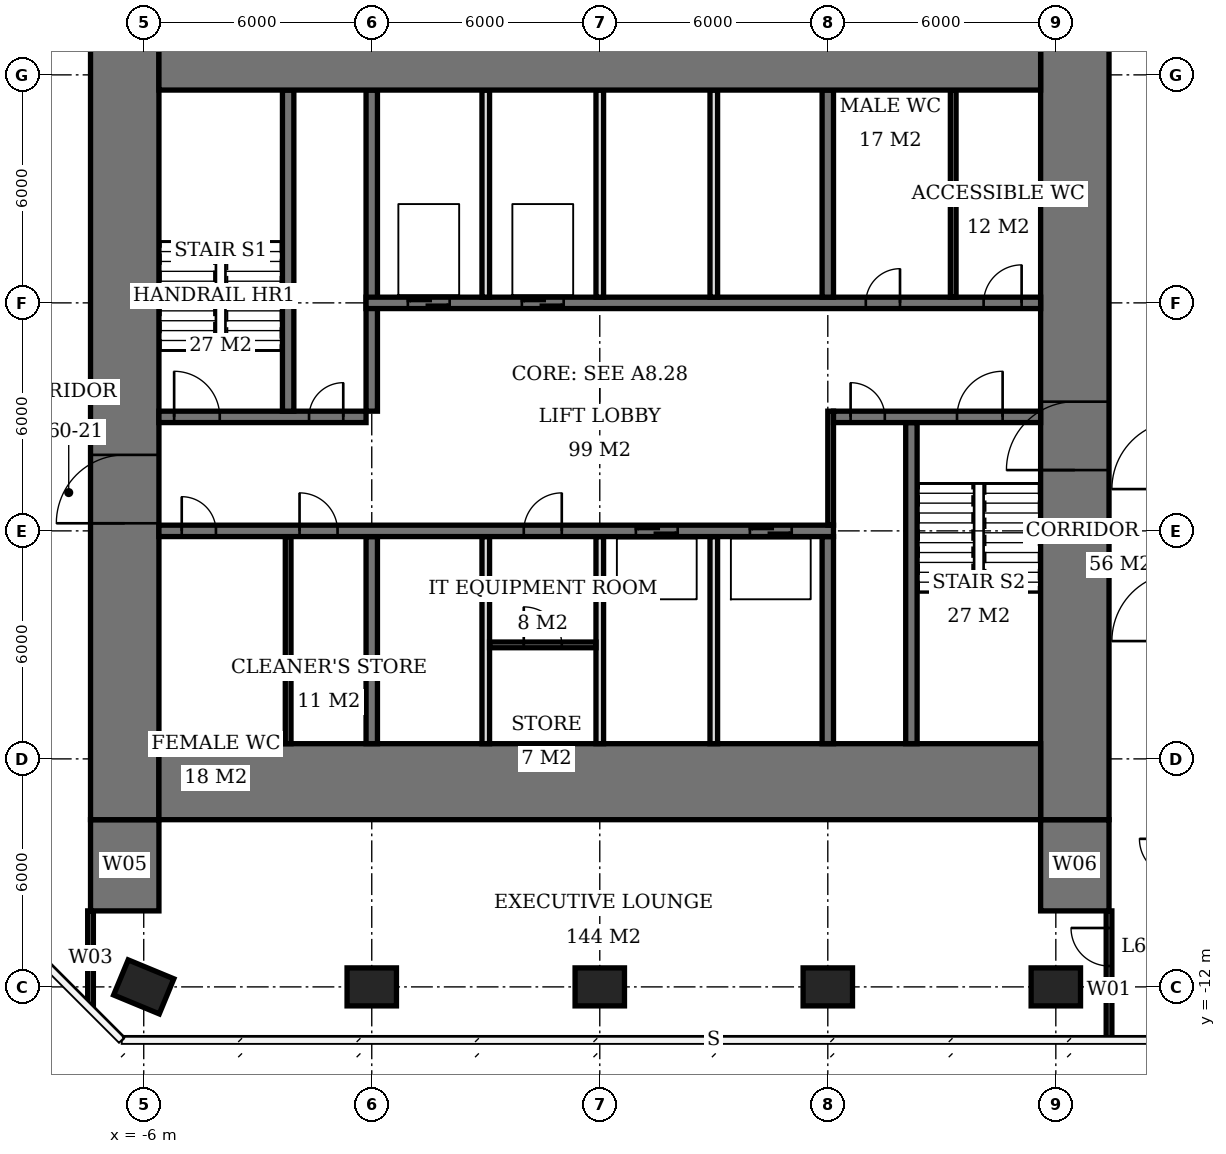
"""IFC4 building model, lengths in metres.
Left out: names, types, materials, properties, quantities, classifications, styles, units other than length and angle.
Written with IfcOpenShell. Run it as: python <this file> out.ifc"""

import sys

from ifc_helpers import new_model, si_unit, direction, frame, frame_2d, origin, origin_2d, place, context, subcontext, project, spatial, rectangle, extrude, element, fill, save


model = new_model("IFC4")
c1 = context("Model", 3, precision=1e-05, world=origin(), true_north=direction((0.0, 1.0)))
c2 = subcontext(c1, "Body", "Model", "MODEL_VIEW")
j1 = project(units=[si_unit("LENGTHUNIT", "METRE"), si_unit("PLANEANGLEUNIT", "RADIAN")], contexts=[c1])
p1 = place(None, origin())
s1 = spatial("IfcSite", under=j1, at=p1, CompositionType="ELEMENT")
p2 = place(p1, origin())
s2 = spatial("IfcBuilding", under=s1, at=p2, CompositionType="ELEMENT")
p3 = place(p2, frame((0.0, 0.0, 245.0)))
s3 = spatial("IfcBuildingStorey", under=s2, at=p3, CompositionType="ELEMENT", Elevation=245.0)
for number, where, z_axis, x_axis in (
    (1, (-6.0, -12.0, 0.0), (0.0, 0.0, 1.0), (-0.924, 0.383, 0.0)),
    (2, (0.0, -12.0, 0.0), (0.0, 0.0, 1.0), (1.0, 0.0, 0.0)),
    (3, (6.0, -12.0, 0.0), (0.0, 0.0, 1.0), (1.0, 0.0, 0.0)),
    (4, (12.0, -12.0, 0.0), (0.0, 0.0, 1.0), (1.0, 0.0, 0.0)),
    (5, (18.0, -12.0, 0.0), (0.0, 0.0, 1.0), (1.0, 0.0, 0.0)),
):
    element("IfcColumn", number, at=place(p3, frame(where, z_axis=z_axis, x_axis=x_axis)), inside=s3, PredefinedType="COLUMN", context=c2, shape_type="SweptSolid", body=[
        extrude(rectangle(XDim=1.3, YDim=1.0, at=origin_2d()), origin(), (0.0, 0.0, 1.0), 3.9),
    ])
for number, where, z_axis, x_axis in (
    (6, (-5.6, -6.6, 0.0), (0.0, 0.0, 1.0), (1.0, 0.0, 0.0)),
    (7, (-5.6, 12.6, 0.0), (0.0, 0.0, 1.0), (1.0, 0.0, 0.0)),
):
    element("IfcWall", number, at=place(p3, frame(where, z_axis=z_axis, x_axis=x_axis)), inside=s3, PredefinedType="SHEAR", context=c2, shape_type="SweptSolid", body=[
        extrude(rectangle(XDim=23.2, YDim=2.0, at=frame_2d((11.6, 0.0))), origin(), (0.0, 0.0, 1.0), 3.9),
    ])
p4 = place(p3, frame((-6.5, -7.6, 0.0), z_axis=(0.0, 0.0, 1.0), x_axis=(0.0, 1.0, 0.0)))
e8 = element("IfcWall", 8, at=p4, inside=s3, PredefinedType="SHEAR", context=c2, shape_type="SweptSolid", body=[
    extrude(rectangle(XDim=21.2, YDim=1.8, at=frame_2d((10.6, 0.0))), origin(), (0.0, 0.0, 1.0), 3.9),
])
p5 = place(p4, frame((7.8, 0.0, 0.0)))
e9 = element("IfcOpeningElement", 9, at=p5, cuts=e8, PredefinedType="OPENING", context=c2, shape_type="SweptSolid", body=[
    extrude(rectangle(XDim=1.8, YDim=2.4, at=frame_2d((0.9, 1.2))), frame((0.0, 0.91, 0.0), z_axis=(0.0, -1.0, 0.0), x_axis=(1.0, 0.0, 0.0)), (0.0, 0.0, 1.0), 1.82),
])
p6 = place(p3, frame((18.5, -7.6, 0.0), z_axis=(0.0, 0.0, 1.0), x_axis=(0.0, 1.0, 0.0)))
e10 = element("IfcWall", 10, at=p6, inside=s3, PredefinedType="SHEAR", context=c2, shape_type="SweptSolid", body=[
    extrude(rectangle(XDim=21.2, YDim=1.8, at=frame_2d((10.6, 0.0))), origin(), (0.0, 0.0, 1.0), 3.9),
])
p7 = place(p6, frame((9.2, 0.0, 0.0)))
e11 = element("IfcOpeningElement", 11, at=p7, cuts=e10, PredefinedType="OPENING", context=c2, shape_type="SweptSolid", body=[
    extrude(rectangle(XDim=1.8, YDim=2.4, at=frame_2d((0.9, 1.2))), frame((0.0, 0.91, 0.0), z_axis=(0.0, -1.0, 0.0), x_axis=(1.0, 0.0, 0.0)), (0.0, 0.0, 1.0), 1.82),
])
for number, where, z_axis, x_axis in (
    (12, (-6.5, -10.0, 0.0), (0.0, 0.0, 1.0), (0.0, 1.0, 0.0)),
    (13, (18.5, -10.0, 0.0), (0.0, 0.0, 1.0), (0.0, 1.0, 0.0)),
):
    element("IfcWall", number, at=place(p3, frame(where, z_axis=z_axis, x_axis=x_axis)), inside=s3, PredefinedType="SHEAR", context=c2, shape_type="SweptSolid", body=[
        extrude(rectangle(XDim=2.4, YDim=1.8, at=frame_2d((1.2, 0.0))), origin(), (0.0, 0.0, 1.0), 3.9),
    ])
p8 = place(p3, frame((-5.6, 0.0, 0.0), z_axis=(0.0, 0.0, 1.0), x_axis=(1.0, 0.0, 0.0)))
e14 = element("IfcWall", 14, at=p8, inside=s3, PredefinedType="SHEAR", context=c2, shape_type="SweptSolid", body=[
    extrude(rectangle(XDim=17.75, YDim=0.3, at=frame_2d((8.875, 0.0))), origin(), (0.0, 0.0, 1.0), 3.9),
])
p9 = place(p8, frame((0.6, 0.0, 0.0)))
e15 = element("IfcOpeningElement", 15, at=p9, cuts=e14, PredefinedType="OPENING", context=c2, shape_type="SweptSolid", body=[
    extrude(rectangle(XDim=0.9, YDim=2.1, at=frame_2d((0.45, 1.05))), frame((0.0, 0.16, 0.0), z_axis=(0.0, -1.0, 0.0), x_axis=(1.0, 0.0, 0.0)), (0.0, 0.0, 1.0), 0.32),
])
p10 = place(p8, frame((3.7, 0.0, 0.0)))
e16 = element("IfcOpeningElement", 16, at=p10, cuts=e14, PredefinedType="OPENING", context=c2, shape_type="SweptSolid", body=[
    extrude(rectangle(XDim=1.0, YDim=2.1, at=frame_2d((0.5, 1.05))), frame((0.0, 0.16, 0.0), z_axis=(0.0, -1.0, 0.0), x_axis=(1.0, 0.0, 0.0)), (0.0, 0.0, 1.0), 0.32),
])
p11 = place(p8, frame((9.6, 0.0, 0.0)))
e17 = element("IfcOpeningElement", 17, at=p11, cuts=e14, PredefinedType="OPENING", context=c2, shape_type="SweptSolid", body=[
    extrude(rectangle(XDim=1.0, YDim=2.1, at=frame_2d((0.5, 1.05))), frame((0.0, 0.16, 0.0), z_axis=(0.0, -1.0, 0.0), x_axis=(1.0, 0.0, 0.0)), (0.0, 0.0, 1.0), 0.32),
])
p12 = place(p8, frame((12.55, 0.0, 0.0)))
e18 = element("IfcOpeningElement", 18, at=p12, cuts=e14, PredefinedType="OPENING", context=c2, shape_type="SweptSolid", body=[
    extrude(rectangle(XDim=1.1, YDim=2.1, at=frame_2d((0.55, 1.05))), frame((0.0, 0.16, 0.0), z_axis=(0.0, -1.0, 0.0), x_axis=(1.0, 0.0, 0.0)), (0.0, 0.0, 1.0), 0.32),
])
p13 = place(p8, frame((15.55, 0.0, 0.0)))
e19 = element("IfcOpeningElement", 19, at=p13, cuts=e14, PredefinedType="OPENING", context=c2, shape_type="SweptSolid", body=[
    extrude(rectangle(XDim=1.1, YDim=2.1, at=frame_2d((0.55, 1.05))), frame((0.0, 0.16, 0.0), z_axis=(0.0, -1.0, 0.0), x_axis=(1.0, 0.0, 0.0)), (0.0, 0.0, 1.0), 0.32),
])
p14 = place(p3, frame((-5.6, 3.0, 0.0), z_axis=(0.0, 0.0, 1.0), x_axis=(1.0, 0.0, 0.0)))
e20 = element("IfcWall", 20, at=p14, inside=s3, PredefinedType="SHEAR", context=c2, shape_type="SweptSolid", body=[
    extrude(rectangle(XDim=5.45, YDim=0.3, at=frame_2d((2.725, 0.0))), origin(), (0.0, 0.0, 1.0), 3.9),
])
p15 = place(p14, frame((0.4, 0.0, 0.0)))
e21 = element("IfcOpeningElement", 21, at=p15, cuts=e20, PredefinedType="OPENING", context=c2, shape_type="SweptSolid", body=[
    extrude(rectangle(XDim=1.2, YDim=2.1, at=frame_2d((0.6, 1.05))), frame((0.0, 0.16, 0.0), z_axis=(0.0, -1.0, 0.0), x_axis=(1.0, 0.0, 0.0)), (0.0, 0.0, 1.0), 0.32),
])
p16 = place(p14, frame((3.95, 0.0, 0.0)))
e22 = element("IfcOpeningElement", 22, at=p16, cuts=e20, PredefinedType="OPENING", context=c2, shape_type="SweptSolid", body=[
    extrude(rectangle(XDim=0.9, YDim=2.1, at=frame_2d((0.45, 1.05))), frame((0.0, 0.16, 0.0), z_axis=(0.0, -1.0, 0.0), x_axis=(1.0, 0.0, 0.0)), (0.0, 0.0, 1.0), 0.32),
])
p17 = place(p3, frame((12.15, 3.0, 0.0), z_axis=(0.0, 0.0, 1.0), x_axis=(1.0, 0.0, 0.0)))
e23 = element("IfcWall", 23, at=p17, inside=s3, PredefinedType="SHEAR", context=c2, shape_type="SweptSolid", body=[
    extrude(rectangle(XDim=5.45, YDim=0.3, at=frame_2d((2.725, 0.0))), origin(), (0.0, 0.0, 1.0), 3.9),
])
p18 = place(p17, frame((3.25, 0.0, 0.0)))
e24 = element("IfcOpeningElement", 24, at=p18, cuts=e23, PredefinedType="OPENING", context=c2, shape_type="SweptSolid", body=[
    extrude(rectangle(XDim=1.2, YDim=2.1, at=frame_2d((0.6, 1.05))), frame((0.0, 0.16, 0.0), z_axis=(0.0, -1.0, 0.0), x_axis=(1.0, 0.0, 0.0)), (0.0, 0.0, 1.0), 0.32),
])
p19 = place(p17, frame((0.45, 0.0, 0.0)))
e25 = element("IfcOpeningElement", 25, at=p19, cuts=e23, PredefinedType="OPENING", context=c2, shape_type="SweptSolid", body=[
    extrude(rectangle(XDim=0.9, YDim=2.1, at=frame_2d((0.45, 1.05))), frame((0.0, 0.16, 0.0), z_axis=(0.0, -1.0, 0.0), x_axis=(1.0, 0.0, 0.0)), (0.0, 0.0, 1.0), 0.32),
])
p20 = place(p3, frame((-0.15, 6.0, 0.0), z_axis=(0.0, 0.0, 1.0), x_axis=(1.0, 0.0, 0.0)))
e26 = element("IfcWall", 26, at=p20, inside=s3, PredefinedType="SHEAR", context=c2, shape_type="SweptSolid", body=[
    extrude(rectangle(XDim=17.75, YDim=0.3, at=frame_2d((8.875, 0.0))), origin(), (0.0, 0.0, 1.0), 3.9),
])
p21 = place(p20, frame((13.15, 0.0, 0.0)))
e27 = element("IfcOpeningElement", 27, at=p21, cuts=e26, PredefinedType="OPENING", context=c2, shape_type="SweptSolid", body=[
    extrude(rectangle(XDim=0.9, YDim=2.1, at=frame_2d((0.45, 1.05))), frame((0.0, 0.16, 0.0), z_axis=(0.0, -1.0, 0.0), x_axis=(1.0, 0.0, 0.0)), (0.0, 0.0, 1.0), 0.32),
])
p22 = place(p20, frame((16.25, 0.0, 0.0)))
e28 = element("IfcOpeningElement", 28, at=p22, cuts=e26, PredefinedType="OPENING", context=c2, shape_type="SweptSolid", body=[
    extrude(rectangle(XDim=1.0, YDim=2.1, at=frame_2d((0.5, 1.05))), frame((0.0, 0.16, 0.0), z_axis=(0.0, -1.0, 0.0), x_axis=(1.0, 0.0, 0.0)), (0.0, 0.0, 1.0), 0.32),
])
p23 = place(p20, frame((1.1, 0.0, 0.0)))
e29 = element("IfcOpeningElement", 29, at=p23, cuts=e26, PredefinedType="OPENING", context=c2, shape_type="SweptSolid", body=[
    extrude(rectangle(XDim=1.1, YDim=2.1, at=frame_2d((0.55, 1.05))), frame((0.0, 0.16, 0.0), z_axis=(0.0, -1.0, 0.0), x_axis=(1.0, 0.0, 0.0)), (0.0, 0.0, 1.0), 0.32),
])
p24 = place(p20, frame((4.1, 0.0, 0.0)))
e30 = element("IfcOpeningElement", 30, at=p24, cuts=e26, PredefinedType="OPENING", context=c2, shape_type="SweptSolid", body=[
    extrude(rectangle(XDim=1.1, YDim=2.1, at=frame_2d((0.55, 1.05))), frame((0.0, 0.16, 0.0), z_axis=(0.0, -1.0, 0.0), x_axis=(1.0, 0.0, 0.0)), (0.0, 0.0, 1.0), 0.32),
])
p25 = place(p3, frame((0.0, -5.6, 0.0), z_axis=(0.0, 0.0, 1.0), x_axis=(0.0, 1.0, 0.0)))
e31 = element("IfcWall", 31, at=p25, inside=s3, PredefinedType="SHEAR", context=c2, shape_type="SweptSolid", body=[
    extrude(rectangle(XDim=5.45, YDim=0.3, at=frame_2d((2.725, 0.0))), origin(), (0.0, 0.0, 1.0), 3.9),
])
p26 = place(p3, frame((0.0, 3.15, 0.0), z_axis=(0.0, 0.0, 1.0), x_axis=(0.0, 1.0, 0.0)))
e32 = element("IfcWall", 32, at=p26, inside=s3, PredefinedType="SHEAR", context=c2, shape_type="SweptSolid", body=[
    extrude(rectangle(XDim=8.45, YDim=0.3, at=frame_2d((4.225, 0.0))), origin(), (0.0, 0.0, 1.0), 3.9),
])
for number, where, z_axis, x_axis in (
    (33, (12.0, -5.6, 0.0), (0.0, 0.0, 1.0), (0.0, 1.0, 0.0)),
    (34, (12.0, 6.15, 0.0), (0.0, 0.0, 1.0), (0.0, 1.0, 0.0)),
):
    element("IfcWall", number, at=place(p3, frame(where, z_axis=z_axis, x_axis=x_axis)), inside=s3, PredefinedType="SHEAR", context=c2, shape_type="SweptSolid", body=[
        extrude(rectangle(XDim=5.45, YDim=0.3, at=frame_2d((2.725, 0.0))), origin(), (0.0, 0.0, 1.0), 3.9),
    ])
for number, where, z_axis, x_axis in (
    (35, (-2.2, 3.15, 0.0), (0.0, 0.0, 1.0), (0.0, 1.0, 0.0)),
    (36, (14.2, -5.6, 0.0), (0.0, 0.0, 1.0), (0.0, 1.0, 0.0)),
):
    element("IfcWall", number, at=place(p3, frame(where, z_axis=z_axis, x_axis=x_axis)), inside=s3, PredefinedType="SHEAR", context=c2, shape_type="SweptSolid", body=[
        extrude(rectangle(XDim=8.45, YDim=0.3, at=frame_2d((4.225, 0.0))), origin(), (0.0, 0.0, 1.0), 3.9),
    ])
for number, where, z_axis, x_axis in (
    (37, (3.0, 6.15, 0.0), (0.0, 0.0, 1.0), (0.0, 1.0, 0.0)),
    (38, (6.0, 6.15, 0.0), (0.0, 0.0, 1.0), (0.0, 1.0, 0.0)),
    (39, (9.0, 6.15, 0.0), (0.0, 0.0, 1.0), (0.0, 1.0, 0.0)),
    (40, (3.0, -5.6, 0.0), (0.0, 0.0, 1.0), (0.0, 1.0, 0.0)),
    (41, (6.0, -5.6, 0.0), (0.0, 0.0, 1.0), (0.0, 1.0, 0.0)),
    (42, (9.0, -5.6, 0.0), (0.0, 0.0, 1.0), (0.0, 1.0, 0.0)),
):
    element("IfcWall", number, at=place(p3, frame(where, z_axis=z_axis, x_axis=x_axis)), inside=s3, PredefinedType="SOLIDWALL", context=c2, shape_type="SweptSolid", body=[
        extrude(rectangle(XDim=5.45, YDim=0.2, at=frame_2d((2.725, 0.0))), origin(), (0.0, 0.0, 1.0), 3.9),
    ])
for number, where, z_axis, x_axis in (
    (43, (-2.2, -5.6, 0.0), (0.0, 0.0, 1.0), (0.0, 1.0, 0.0)),
    (44, (15.3, 6.15, 0.0), (0.0, 0.0, 1.0), (0.0, 1.0, 0.0)),
):
    element("IfcWall", number, at=place(p3, frame(where, z_axis=z_axis, x_axis=x_axis)), inside=s3, PredefinedType="PLUMBINGWALL", context=c2, shape_type="SweptSolid", body=[
        extrude(rectangle(XDim=5.45, YDim=0.15, at=frame_2d((2.725, 0.0))), origin(), (0.0, 0.0, 1.0), 3.65),
    ])
p27 = place(p3, frame((3.1, -3.0, 0.0), z_axis=(0.0, 0.0, 1.0), x_axis=(1.0, 0.0, 0.0)))
e45 = element("IfcWall", 45, at=p27, inside=s3, PredefinedType="PARTITIONING", context=c2, shape_type="SweptSolid", body=[
    extrude(rectangle(XDim=2.8, YDim=0.15, at=frame_2d((1.4, 0.0))), origin(), (0.0, 0.0, 1.0), 3.65),
])
p28 = place(p27, frame((0.9, 0.0, 0.0)))
e46 = element("IfcOpeningElement", 46, at=p28, cuts=e45, PredefinedType="OPENING", context=c2, shape_type="SweptSolid", body=[
    extrude(rectangle(XDim=1.0, YDim=2.1, at=frame_2d((0.5, 1.05))), frame((0.0, 0.085, 0.0), z_axis=(0.0, -1.0, 0.0), x_axis=(1.0, 0.0, 0.0)), (0.0, 0.0, 1.0), 0.17),
])
p29 = place(p3, frame((-7.4, -12.489, 0.0), z_axis=(0.0, 0.0, 1.0), x_axis=(0.0, 1.0, 0.0)))
e47 = element("IfcWall", 47, at=p29, inside=s3, PredefinedType="PARTITIONING", context=c2, shape_type="SweptSolid", body=[
    extrude(rectangle(XDim=2.489, YDim=0.15, at=frame_2d((1.245, 0.0))), origin(), (0.0, 0.0, 1.0), 3.65),
])
p30 = place(p3, frame((19.4, -13.375, 0.0), z_axis=(0.0, 0.0, 1.0), x_axis=(0.0, 1.0, 0.0)))
e48 = element("IfcWall", 48, at=p30, inside=s3, PredefinedType="PARTITIONING", context=c2, shape_type="SweptSolid", body=[
    extrude(rectangle(XDim=3.375, YDim=0.15, at=frame_2d((1.688, 0.0))), origin(), (0.0, 0.0, 1.0), 3.65),
])
p31 = place(p30, frame((1.925, 0.0, 0.0)))
e49 = element("IfcOpeningElement", 49, at=p31, cuts=e48, PredefinedType="OPENING", context=c2, shape_type="SweptSolid", body=[
    extrude(rectangle(XDim=1.0, YDim=2.1, at=frame_2d((0.5, 1.05))), frame((0.0, 0.085, 0.0), z_axis=(0.0, -1.0, 0.0), x_axis=(1.0, 0.0, 0.0)), (0.0, 0.0, 1.0), 0.17),
])
p32 = place(p3, frame((12.075, 0.15, 0.0), z_axis=(0.0, 0.0, 1.0), x_axis=(0.0, 1.0, 0.0)))
e50 = element("IfcWall", 50, at=p32, inside=s3, PredefinedType="PARTITIONING", context=c2, shape_type="SweptSolid", body=[
    extrude(rectangle(XDim=3.0, YDim=0.15, at=frame_2d((1.5, 0.0))), origin(), (0.0, 0.0, 1.0), 3.65),
])
p33 = place(p5, origin())
e51 = element("IfcDoor", 51, at=p33, inside=s3, OperationType="DOUBLE_DOOR_SINGLE_SWING", PredefinedType="DOOR", context=c2, shape_type="SweptSolid", body=[
    extrude(rectangle(XDim=1.8, YDim=2.4, at=frame_2d((0.9, 1.2))), frame((0.0, 0.025, 0.0), z_axis=(0.0, -1.0, 0.0), x_axis=(1.0, 0.0, 0.0)), (0.0, 0.0, 1.0), 0.05),
])
fill(e9, e51)
p34 = place(p7, origin())
e52 = element("IfcDoor", 52, at=p34, inside=s3, OperationType="DOUBLE_DOOR_SINGLE_SWING", PredefinedType="DOOR", context=c2, shape_type="SweptSolid", body=[
    extrude(rectangle(XDim=1.8, YDim=2.4, at=frame_2d((0.9, 1.2))), frame((0.0, 0.025, 0.0), z_axis=(0.0, -1.0, 0.0), x_axis=(1.0, 0.0, 0.0)), (0.0, 0.0, 1.0), 0.05),
])
fill(e11, e52)
p35 = place(p15, origin())
e53 = element("IfcDoor", 53, at=p35, inside=s3, OperationType="SINGLE_SWING_LEFT", PredefinedType="DOOR", context=c2, shape_type="SweptSolid", body=[
    extrude(rectangle(XDim=1.2, YDim=2.1, at=frame_2d((0.6, 1.05))), frame((0.0, 0.025, 0.0), z_axis=(0.0, -1.0, 0.0), x_axis=(1.0, 0.0, 0.0)), (0.0, 0.0, 1.0), 0.05),
])
fill(e21, e53)
p36 = place(p16, origin())
e54 = element("IfcDoor", 54, at=p36, inside=s3, OperationType="SINGLE_SWING_RIGHT", PredefinedType="DOOR", context=c2, shape_type="SweptSolid", body=[
    extrude(rectangle(XDim=0.9, YDim=2.1, at=frame_2d((0.45, 1.05))), frame((0.0, 0.025, 0.0), z_axis=(0.0, -1.0, 0.0), x_axis=(1.0, 0.0, 0.0)), (0.0, 0.0, 1.0), 0.05),
])
fill(e22, e54)
p37 = place(p18, origin())
e55 = element("IfcDoor", 55, at=p37, inside=s3, OperationType="SINGLE_SWING_RIGHT", PredefinedType="DOOR", context=c2, shape_type="SweptSolid", body=[
    extrude(rectangle(XDim=1.2, YDim=2.1, at=frame_2d((0.6, 1.05))), frame((0.0, 0.025, 0.0), z_axis=(0.0, -1.0, 0.0), x_axis=(1.0, 0.0, 0.0)), (0.0, 0.0, 1.0), 0.05),
])
fill(e24, e55)
p38 = place(p19, origin())
e56 = element("IfcDoor", 56, at=p38, inside=s3, OperationType="SINGLE_SWING_LEFT", PredefinedType="DOOR", context=c2, shape_type="SweptSolid", body=[
    extrude(rectangle(XDim=0.9, YDim=2.1, at=frame_2d((0.45, 1.05))), frame((0.0, 0.025, 0.0), z_axis=(0.0, -1.0, 0.0), x_axis=(1.0, 0.0, 0.0)), (0.0, 0.0, 1.0), 0.05),
])
fill(e25, e56)
p39 = place(p9, origin())
e57 = element("IfcDoor", 57, at=p39, inside=s3, OperationType="SINGLE_SWING_LEFT", PredefinedType="DOOR", context=c2, shape_type="SweptSolid", body=[
    extrude(rectangle(XDim=0.9, YDim=2.1, at=frame_2d((0.45, 1.05))), frame((0.0, 0.025, 0.0), z_axis=(0.0, -1.0, 0.0), x_axis=(1.0, 0.0, 0.0)), (0.0, 0.0, 1.0), 0.05),
])
fill(e15, e57)
p40 = place(p10, origin())
e58 = element("IfcDoor", 58, at=p40, inside=s3, OperationType="SINGLE_SWING_LEFT", PredefinedType="DOOR", context=c2, shape_type="SweptSolid", body=[
    extrude(rectangle(XDim=1.0, YDim=2.1, at=frame_2d((0.5, 1.05))), frame((0.0, 0.025, 0.0), z_axis=(0.0, -1.0, 0.0), x_axis=(1.0, 0.0, 0.0)), (0.0, 0.0, 1.0), 0.05),
])
fill(e16, e58)
p41 = place(p21, origin())
e59 = element("IfcDoor", 59, at=p41, inside=s3, OperationType="SINGLE_SWING_RIGHT", PredefinedType="DOOR", context=c2, shape_type="SweptSolid", body=[
    extrude(rectangle(XDim=0.9, YDim=2.1, at=frame_2d((0.45, 1.05))), frame((0.0, 0.025, 0.0), z_axis=(0.0, -1.0, 0.0), x_axis=(1.0, 0.0, 0.0)), (0.0, 0.0, 1.0), 0.05),
])
fill(e27, e59)
p42 = place(p22, origin())
e60 = element("IfcDoor", 60, at=p42, inside=s3, OperationType="SINGLE_SWING_RIGHT", PredefinedType="DOOR", context=c2, shape_type="SweptSolid", body=[
    extrude(rectangle(XDim=1.0, YDim=2.1, at=frame_2d((0.5, 1.05))), frame((0.0, 0.025, 0.0), z_axis=(0.0, -1.0, 0.0), x_axis=(1.0, 0.0, 0.0)), (0.0, 0.0, 1.0), 0.05),
])
fill(e28, e60)
p43 = place(p28, origin())
e61 = element("IfcDoor", 61, at=p43, inside=s3, OperationType="SINGLE_SWING_LEFT", PredefinedType="DOOR", context=c2, shape_type="SweptSolid", body=[
    extrude(rectangle(XDim=1.0, YDim=2.1, at=frame_2d((0.5, 1.05))), frame((0.0, 0.025, 0.0), z_axis=(0.0, -1.0, 0.0), x_axis=(1.0, 0.0, 0.0)), (0.0, 0.0, 1.0), 0.05),
])
fill(e46, e61)
p44 = place(p11, origin())
e62 = element("IfcDoor", 62, at=p44, inside=s3, OperationType="SINGLE_SWING_RIGHT", PredefinedType="DOOR", context=c2, shape_type="SweptSolid", body=[
    extrude(rectangle(XDim=1.0, YDim=2.1, at=frame_2d((0.5, 1.05))), frame((0.0, 0.025, 0.0), z_axis=(0.0, -1.0, 0.0), x_axis=(1.0, 0.0, 0.0)), (0.0, 0.0, 1.0), 0.05),
])
fill(e17, e62)
p45 = place(p23, origin())
e63 = element("IfcDoor", 63, at=p45, inside=s3, OperationType="DOUBLE_DOOR_SLIDING", PredefinedType="USERDEFINED", context=c2, shape_type="SweptSolid", body=[
    extrude(rectangle(XDim=1.1, YDim=2.1, at=frame_2d((0.55, 1.05))), frame((0.0, 0.025, 0.0), z_axis=(0.0, -1.0, 0.0), x_axis=(1.0, 0.0, 0.0)), (0.0, 0.0, 1.0), 0.05),
])
fill(e29, e63)
p46 = place(p24, origin())
e64 = element("IfcDoor", 64, at=p46, inside=s3, OperationType="DOUBLE_DOOR_SLIDING", PredefinedType="USERDEFINED", context=c2, shape_type="SweptSolid", body=[
    extrude(rectangle(XDim=1.1, YDim=2.1, at=frame_2d((0.55, 1.05))), frame((0.0, 0.025, 0.0), z_axis=(0.0, -1.0, 0.0), x_axis=(1.0, 0.0, 0.0)), (0.0, 0.0, 1.0), 0.05),
])
fill(e30, e64)
p47 = place(p12, origin())
e65 = element("IfcDoor", 65, at=p47, inside=s3, OperationType="DOUBLE_DOOR_SLIDING", PredefinedType="USERDEFINED", context=c2, shape_type="SweptSolid", body=[
    extrude(rectangle(XDim=1.1, YDim=2.1, at=frame_2d((0.55, 1.05))), frame((0.0, 0.025, 0.0), z_axis=(0.0, -1.0, 0.0), x_axis=(1.0, 0.0, 0.0)), (0.0, 0.0, 1.0), 0.05),
])
fill(e18, e65)
p48 = place(p13, origin())
e66 = element("IfcDoor", 66, at=p48, inside=s3, OperationType="DOUBLE_DOOR_SLIDING", PredefinedType="USERDEFINED", context=c2, shape_type="SweptSolid", body=[
    extrude(rectangle(XDim=1.1, YDim=2.1, at=frame_2d((0.55, 1.05))), frame((0.0, 0.025, 0.0), z_axis=(0.0, -1.0, 0.0), x_axis=(1.0, 0.0, 0.0)), (0.0, 0.0, 1.0), 0.05),
])
fill(e19, e66)
p49 = place(p31, origin())
e67 = element("IfcDoor", 67, at=p49, inside=s3, OperationType="SINGLE_SWING_RIGHT", PredefinedType="DOOR", context=c2, shape_type="SweptSolid", body=[
    extrude(rectangle(XDim=1.0, YDim=2.1, at=frame_2d((0.5, 1.05))), frame((0.0, 0.025, 0.0), z_axis=(0.0, -1.0, 0.0), x_axis=(1.0, 0.0, 0.0)), (0.0, 0.0, 1.0), 0.05),
])
fill(e49, e67)
save(model, sys.argv[1])
